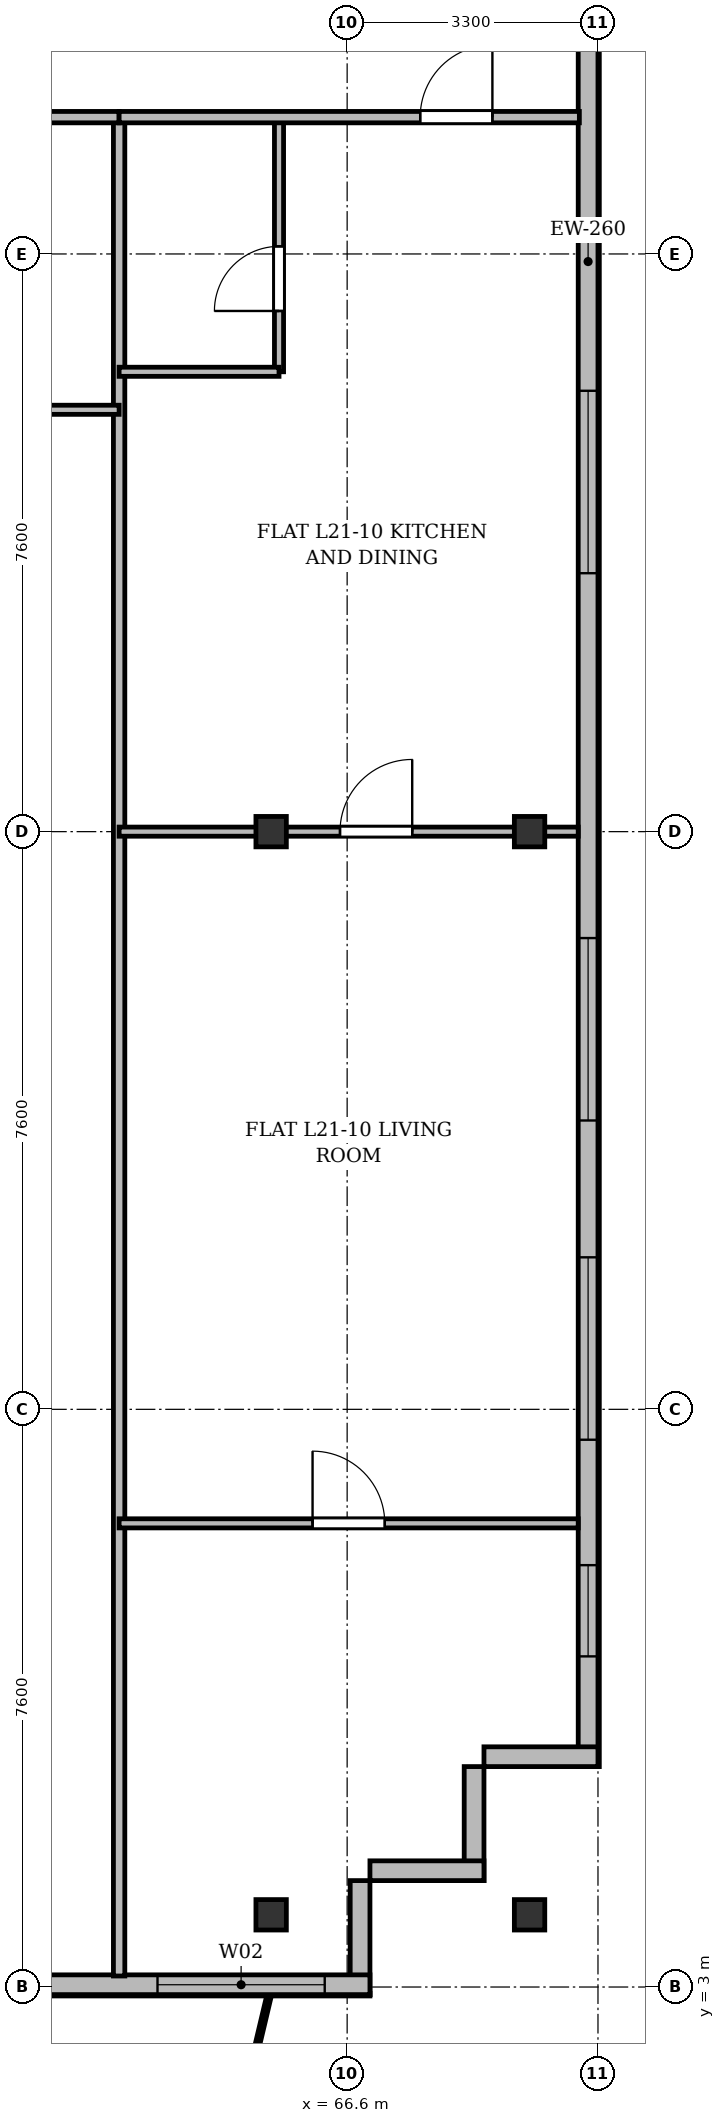
"""IFC4 building model, lengths in metres.
Left out: names, types, materials, properties, quantities, classifications, styles, units other than length and angle.
Written with IfcOpenShell. Run it as: python <this file> out.ifc"""

import sys

from ifc_helpers import new_model, si_unit, direction, frame, frame_2d, origin, origin_2d, place, context, subcontext, project, spatial, rectangle, i_section, extrude, source, transform, mapped, element, fill, save


model = new_model("IFC4")
c1 = context("Model", 3, precision=1e-05, world=origin(), true_north=direction((0.0, 1.0)))
c2 = subcontext(c1, "Body", "Model", "MODEL_VIEW")
j1 = project(units=[si_unit("LENGTHUNIT", "METRE"), si_unit("PLANEANGLEUNIT", "RADIAN")], contexts=[c1])
p1 = place(None, origin())
s1 = spatial("IfcSite", under=j1, at=p1, CompositionType="ELEMENT")
p2 = place(p1, origin())
s2 = spatial("IfcBuilding", under=s1, at=p2, CompositionType="ELEMENT")
p3 = place(p2, frame((0.0, 0.0, 85.3)))
s3 = spatial("IfcBuildingStorey", under=s2, at=p3, CompositionType="ELEMENT", Elevation=85.3)
m1 = source(origin(), c2, "Body", "SweptSolid", [
    extrude(i_section(OverallWidth=0.4, OverallDepth=0.4, WebThickness=0.022, FlangeThickness=0.035, at=origin_2d()), origin(), (0.0, 0.0, 1.0), 3.6),
])
for number, where, z_axis, x_axis in (
    (1, (65.6, 3.95, 0.0), (0.0, 0.0, 1.0), (1.0, 0.0, 0.0)),
    (2, (65.6, 18.2, 0.0), (0.0, 0.0, 1.0), (1.0, 0.0, 0.0)),
    (3, (69.0, 3.95, 0.0), (0.0, 0.0, 1.0), (1.0, 0.0, 0.0)),
    (4, (69.0, 18.2, 0.0), (0.0, 0.0, 1.0), (1.0, 0.0, 0.0)),
):
    element("IfcColumn", number, at=place(p3, frame(where, z_axis=z_axis, x_axis=x_axis)), inside=s3, PredefinedType="COLUMN", context=c2, shape_type="MappedRepresentation", body=[
        mapped(m1, transform((0.0, 0.0, 0.0), x_axis=(1.0, 0.0, 0.0), y_axis=(0.0, 1.0, 0.0), z_axis=(0.0, 0.0, 1.0), scale=1.0)),
    ])
p4 = place(p3, frame((69.77, 45.5, 0.0), z_axis=(0.0, 0.0, 1.0), x_axis=(0.0, -1.0, 0.0)))
e5 = element("IfcWall", 5, at=p4, inside=s3, PredefinedType="SOLIDWALL", context=c2, shape_type="SweptSolid", body=[
    extrude(rectangle(XDim=39.6, YDim=0.26, at=frame_2d((19.8, 0.0))), origin(), (0.0, 0.0, 1.0), 3.34),
])
p5 = place(p4, frame((36.95, 0.0, 0.92)))
e6 = element("IfcOpeningElement", 6, at=p5, cuts=e5, PredefinedType="OPENING", context=c2, shape_type="SweptSolid", body=[
    extrude(rectangle(XDim=1.2, YDim=1.65, at=frame_2d((0.6, 0.825))), frame((0.0, 0.14, 0.0), z_axis=(0.0, -1.0, 0.0), x_axis=(1.0, 0.0, 0.0)), (0.0, 0.0, 1.0), 0.28),
])
p6 = place(p4, frame((32.9, 0.0, 0.92)))
e7 = element("IfcOpeningElement", 7, at=p6, cuts=e5, PredefinedType="OPENING", context=c2, shape_type="SweptSolid", body=[
    extrude(rectangle(XDim=2.4, YDim=2.1, at=frame_2d((1.2, 1.05))), frame((0.0, 0.14, 0.0), z_axis=(0.0, -1.0, 0.0), x_axis=(1.0, 0.0, 0.0)), (0.0, 0.0, 1.0), 0.28),
])
p7 = place(p4, frame((28.7, 0.0, 0.92)))
e8 = element("IfcOpeningElement", 8, at=p7, cuts=e5, PredefinedType="OPENING", context=c2, shape_type="SweptSolid", body=[
    extrude(rectangle(XDim=2.4, YDim=2.1, at=frame_2d((1.2, 1.05))), frame((0.0, 0.14, 0.0), z_axis=(0.0, -1.0, 0.0), x_axis=(1.0, 0.0, 0.0)), (0.0, 0.0, 1.0), 0.28),
])
p8 = place(p4, frame((21.5, 0.0, 0.92)))
e9 = element("IfcOpeningElement", 9, at=p8, cuts=e5, PredefinedType="OPENING", context=c2, shape_type="SweptSolid", body=[
    extrude(rectangle(XDim=2.4, YDim=2.1, at=frame_2d((1.2, 1.05))), frame((0.0, 0.14, 0.0), z_axis=(0.0, -1.0, 0.0), x_axis=(1.0, 0.0, 0.0)), (0.0, 0.0, 1.0), 0.28),
])
p9 = place(p4, frame((7.5, 0.0, 0.92)))
e10 = element("IfcOpeningElement", 10, at=p9, cuts=e5, PredefinedType="OPENING", context=c2, shape_type="SweptSolid", body=[
    extrude(rectangle(XDim=2.4, YDim=2.1, at=frame_2d((1.2, 1.05))), frame((0.0, 0.14, 0.0), z_axis=(0.0, -1.0, 0.0), x_axis=(1.0, 0.0, 0.0)), (0.0, 0.0, 1.0), 0.28),
])
p10 = place(p4, frame((4.5, 0.0, 0.92)))
e11 = element("IfcOpeningElement", 11, at=p10, cuts=e5, PredefinedType="OPENING", context=c2, shape_type="SweptSolid", body=[
    extrude(rectangle(XDim=1.2, YDim=1.65, at=frame_2d((0.6, 0.825))), frame((0.0, 0.14, 0.0), z_axis=(0.0, -1.0, 0.0), x_axis=(1.0, 0.0, 0.0)), (0.0, 0.0, 1.0), 0.28),
])
p11 = place(p4, frame((1.15, 0.0, 0.92)))
e12 = element("IfcOpeningElement", 12, at=p11, cuts=e5, PredefinedType="OPENING", context=c2, shape_type="SweptSolid", body=[
    extrude(rectangle(XDim=1.2, YDim=1.65, at=frame_2d((0.6, 0.825))), frame((0.0, 0.14, 0.0), z_axis=(0.0, -1.0, 0.0), x_axis=(1.0, 0.0, 0.0)), (0.0, 0.0, 1.0), 0.28),
])
p12 = place(p3, frame((69.9, 6.03, 0.0), z_axis=(0.0, 0.0, 1.0), x_axis=(-1.0, 0.0, 0.0)))
e13 = element("IfcWall", 13, at=p12, inside=s3, PredefinedType="SOLIDWALL", context=c2, shape_type="SweptSolid", body=[
    extrude(rectangle(XDim=1.5, YDim=0.26, at=frame_2d((0.75, 0.0))), origin(), (0.0, 0.0, 1.0), 2.84),
])
for number, where, z_axis, x_axis in (
    (14, (68.27, 5.9, 0.0), (0.0, 0.0, 1.0), (0.0, -1.0, 0.0)),
    (15, (68.4, 4.53, 0.0), (0.0, 0.0, 1.0), (-1.0, 0.0, 0.0)),
):
    element("IfcWall", number, at=place(p3, frame(where, z_axis=z_axis, x_axis=x_axis)), inside=s3, PredefinedType="SOLIDWALL", context=c2, shape_type="SweptSolid", body=[
        extrude(rectangle(XDim=1.5, YDim=0.26, at=frame_2d((0.75, 0.0))), origin(), (0.0, 0.0, 1.0), 3.34),
    ])
p13 = place(p3, frame((66.77, 4.4, 0.0), z_axis=(0.0, 0.0, 1.0), x_axis=(0.0, -1.0, 0.0)))
e16 = element("IfcWall", 16, at=p13, inside=s3, PredefinedType="SOLIDWALL", context=c2, shape_type="SweptSolid", body=[
    extrude(rectangle(XDim=1.5, YDim=0.26, at=frame_2d((0.75, 0.0))), origin(), (0.0, 0.0, 1.0), 2.752),
])
p14 = place(p3, frame((66.9, 3.03, 0.0), z_axis=(0.0, 0.0, 1.0), x_axis=(-1.0, 0.0, 0.0)))
e17 = element("IfcWall", 17, at=p14, inside=s3, PredefinedType="SOLIDWALL", context=c2, shape_type="SweptSolid", body=[
    extrude(rectangle(XDim=59.4, YDim=0.26, at=frame_2d((29.7, 0.0))), origin(), (0.0, 0.0, 1.0), 3.34),
])
p15 = place(p14, frame((0.595, 0.0, 0.9)))
e18 = element("IfcOpeningElement", 18, at=p15, cuts=e17, PredefinedType="OPENING", context=c2, shape_type="SweptSolid", body=[
    extrude(rectangle(XDim=2.2, YDim=1.8, at=frame_2d((1.1, 0.9))), frame((0.0, 0.14, 0.0), z_axis=(0.0, -1.0, 0.0), x_axis=(1.0, 0.0, 0.0)), (0.0, 0.0, 1.0), 0.28),
])
p16 = place(p14, frame((4.95, 0.0, 0.9)))
e19 = element("IfcOpeningElement", 19, at=p16, cuts=e17, PredefinedType="OPENING", context=c2, shape_type="SweptSolid", body=[
    extrude(rectangle(XDim=1.5, YDim=1.75, at=frame_2d((0.75, 0.875))), frame((0.0, 0.14, 0.0), z_axis=(0.0, -1.0, 0.0), x_axis=(1.0, 0.0, 0.0)), (0.0, 0.0, 1.0), 0.28),
])
p17 = place(p14, frame((9.18, 0.0, 0.0)))
e20 = element("IfcOpeningElement", 20, at=p17, cuts=e17, PredefinedType="OPENING", context=c2, shape_type="SweptSolid", body=[
    extrude(rectangle(XDim=1.2, YDim=2.2, at=frame_2d((0.6, 1.1))), frame((0.0, 0.14, 0.0), z_axis=(0.0, -1.0, 0.0), x_axis=(1.0, 0.0, 0.0)), (0.0, 0.0, 1.0), 0.28),
])
p18 = place(p14, frame((13.125, 0.0, 0.9)))
e21 = element("IfcOpeningElement", 21, at=p18, cuts=e17, PredefinedType="OPENING", context=c2, shape_type="SweptSolid", body=[
    extrude(rectangle(XDim=1.65, YDim=1.85, at=frame_2d((0.825, 0.925))), frame((0.0, 0.14, 0.0), z_axis=(0.0, -1.0, 0.0), x_axis=(1.0, 0.0, 0.0)), (0.0, 0.0, 1.0), 0.28),
])
p19 = place(p14, frame((16.2, 0.0, 0.9)))
e22 = element("IfcOpeningElement", 22, at=p19, cuts=e17, PredefinedType="OPENING", context=c2, shape_type="SweptSolid", body=[
    extrude(rectangle(XDim=1.8, YDim=1.8, at=frame_2d((0.9, 0.9))), frame((0.0, 0.14, 0.0), z_axis=(0.0, -1.0, 0.0), x_axis=(1.0, 0.0, 0.0)), (0.0, 0.0, 1.0), 0.28),
])
p20 = place(p14, frame((18.75, 0.0, 0.9)))
e23 = element("IfcOpeningElement", 23, at=p20, cuts=e17, PredefinedType="OPENING", context=c2, shape_type="SweptSolid", body=[
    extrude(rectangle(XDim=1.5, YDim=1.75, at=frame_2d((0.75, 0.875))), frame((0.0, 0.14, 0.0), z_axis=(0.0, -1.0, 0.0), x_axis=(1.0, 0.0, 0.0)), (0.0, 0.0, 1.0), 0.28),
])
p21 = place(p14, frame((21.15, 0.0, 0.9)))
e24 = element("IfcOpeningElement", 24, at=p21, cuts=e17, PredefinedType="OPENING", context=c2, shape_type="SweptSolid", body=[
    extrude(rectangle(XDim=1.5, YDim=1.75, at=frame_2d((0.75, 0.875))), frame((0.0, 0.14, 0.0), z_axis=(0.0, -1.0, 0.0), x_axis=(1.0, 0.0, 0.0)), (0.0, 0.0, 1.0), 0.28),
])
p22 = place(p14, frame((23.85, 0.0, 0.9)))
e25 = element("IfcOpeningElement", 25, at=p22, cuts=e17, PredefinedType="OPENING", context=c2, shape_type="SweptSolid", body=[
    extrude(rectangle(XDim=2.0, YDim=1.95, at=frame_2d((1.0, 0.975))), frame((0.0, 0.14, 0.0), z_axis=(0.0, -1.0, 0.0), x_axis=(1.0, 0.0, 0.0)), (0.0, 0.0, 1.0), 0.28),
])
p23 = place(p14, frame((27.525, 0.0, 0.9)))
e26 = element("IfcOpeningElement", 26, at=p23, cuts=e17, PredefinedType="OPENING", context=c2, shape_type="SweptSolid", body=[
    extrude(rectangle(XDim=1.65, YDim=1.85, at=frame_2d((0.825, 0.925))), frame((0.0, 0.14, 0.0), z_axis=(0.0, -1.0, 0.0), x_axis=(1.0, 0.0, 0.0)), (0.0, 0.0, 1.0), 0.28),
])
p24 = place(p14, frame((32.3, 0.0, 0.9)))
e27 = element("IfcOpeningElement", 27, at=p24, cuts=e17, PredefinedType="OPENING", context=c2, shape_type="SweptSolid", body=[
    extrude(rectangle(XDim=1.8, YDim=1.8, at=frame_2d((0.9, 0.9))), frame((0.0, 0.14, 0.0), z_axis=(0.0, -1.0, 0.0), x_axis=(1.0, 0.0, 0.0)), (0.0, 0.0, 1.0), 0.28),
])
p25 = place(p14, frame((40.301, 0.0, 0.0)))
e28 = element("IfcOpeningElement", 28, at=p25, cuts=e17, PredefinedType="OPENING", context=c2, shape_type="SweptSolid", body=[
    extrude(rectangle(XDim=1.2, YDim=2.2, at=frame_2d((0.6, 1.1))), frame((0.0, 0.14, 0.0), z_axis=(0.0, -1.0, 0.0), x_axis=(1.0, 0.0, 0.0)), (0.0, 0.0, 1.0), 0.28),
])
p26 = place(p14, frame((46.65, 0.0, 0.9)))
e29 = element("IfcOpeningElement", 29, at=p26, cuts=e17, PredefinedType="OPENING", context=c2, shape_type="SweptSolid", body=[
    extrude(rectangle(XDim=1.5, YDim=1.75, at=frame_2d((0.75, 0.875))), frame((0.0, 0.14, 0.0), z_axis=(0.0, -1.0, 0.0), x_axis=(1.0, 0.0, 0.0)), (0.0, 0.0, 1.0), 0.28),
])
p27 = place(p14, frame((54.558, 0.0, 0.0)))
e30 = element("IfcOpeningElement", 30, at=p27, cuts=e17, PredefinedType="OPENING", context=c2, shape_type="SweptSolid", body=[
    extrude(rectangle(XDim=1.2, YDim=2.2, at=frame_2d((0.6, 1.1))), frame((0.0, 0.14, 0.0), z_axis=(0.0, -1.0, 0.0), x_axis=(1.0, 0.0, 0.0)), (0.0, 0.0, 1.0), 0.28),
])
p28 = place(p14, frame((56.98, 0.0, 0.9)))
e31 = element("IfcOpeningElement", 31, at=p28, cuts=e17, PredefinedType="OPENING", context=c2, shape_type="SweptSolid", body=[
    extrude(rectangle(XDim=1.65, YDim=1.85, at=frame_2d((0.825, 0.925))), frame((0.0, 0.14, 0.0), z_axis=(0.0, -1.0, 0.0), x_axis=(1.0, 0.0, 0.0)), (0.0, 0.0, 1.0), 0.28),
])
p29 = place(p3, frame((63.6, 3.145, 0.0), z_axis=(0.0, 0.0, 1.0), x_axis=(0.0, 1.0, 0.0)))
e32 = element("IfcWall", 32, at=p29, inside=s3, PredefinedType="PARTITIONING", context=c2, shape_type="SweptSolid", body=[
    extrude(rectangle(XDim=24.455, YDim=0.15, at=frame_2d((12.228, 0.0))), origin(), (0.0, 0.0, 1.0), 2.752),
])
p30 = place(p3, frame((58.8, 27.6, 0.0), z_axis=(0.0, 0.0, 1.0), x_axis=(1.0, 0.0, 0.0)))
e33 = element("IfcWall", 33, at=p30, inside=s3, PredefinedType="PARTITIONING", context=c2, shape_type="SweptSolid", body=[
    extrude(rectangle(XDim=4.8, YDim=0.15, at=frame_2d((2.4, 0.0))), origin(), (0.0, 0.0, 1.0), 2.84),
])
p31 = place(p30, frame((1.834, 0.0, 0.0)))
e34 = element("IfcOpeningElement", 34, at=p31, cuts=e33, PredefinedType="OPENING", context=c2, shape_type="SweptSolid", body=[
    extrude(rectangle(XDim=0.95, YDim=2.15, at=frame_2d((0.475, 1.075))), frame((0.0, 0.085, 0.0), z_axis=(0.0, -1.0, 0.0), x_axis=(1.0, 0.0, 0.0)), (0.0, 0.0, 1.0), 0.17),
])
p32 = place(p3, frame((58.8, 23.75, 0.0), z_axis=(0.0, 0.0, 1.0), x_axis=(1.0, 0.0, 0.0)))
e35 = element("IfcWall", 35, at=p32, inside=s3, PredefinedType="PARTITIONING", context=c2, shape_type="SweptSolid", body=[
    extrude(rectangle(XDim=4.8, YDim=0.12, at=frame_2d((2.4, 0.0))), origin(), (0.0, 0.0, 1.0), 2.84),
])
p33 = place(p32, frame((1.834, 0.0, 0.0)))
e36 = element("IfcOpeningElement", 36, at=p33, cuts=e35, PredefinedType="OPENING", context=c2, shape_type="SweptSolid", body=[
    extrude(rectangle(XDim=0.95, YDim=2.15, at=frame_2d((0.475, 1.075))), frame((0.0, 0.07, 0.0), z_axis=(0.0, -1.0, 0.0), x_axis=(1.0, 0.0, 0.0)), (0.0, 0.0, 1.0), 0.14),
])
p34 = place(p3, frame((63.6, 18.2, 0.0), z_axis=(0.0, 0.0, 1.0), x_axis=(1.0, 0.0, 0.0)))
e37 = element("IfcWall", 37, at=p34, inside=s3, PredefinedType="PARTITIONING", context=c2, shape_type="SweptSolid", body=[
    extrude(rectangle(XDim=6.04, YDim=0.12, at=frame_2d((3.02, 0.0))), origin(), (0.0, 0.0, 1.0), 2.752),
])
p35 = place(p34, frame((2.906, 0.0, 0.0)))
e38 = element("IfcOpeningElement", 38, at=p35, cuts=e37, PredefinedType="OPENING", context=c2, shape_type="SweptSolid", body=[
    extrude(rectangle(XDim=0.95, YDim=2.15, at=frame_2d((0.475, 1.075))), frame((0.0, 0.07, 0.0), z_axis=(0.0, -1.0, 0.0), x_axis=(1.0, 0.0, 0.0)), (0.0, 0.0, 1.0), 0.14),
])
p36 = place(p3, frame((65.704, 24.25, 0.0), z_axis=(0.0, 0.0, 1.0), x_axis=(0.0, 1.0, 0.0)))
e39 = element("IfcWall", 39, at=p36, inside=s3, PredefinedType="PARTITIONING", context=c2, shape_type="SweptSolid", body=[
    extrude(rectangle(XDim=3.35, YDim=0.12, at=frame_2d((1.675, 0.0))), origin(), (0.0, 0.0, 1.0), 2.84),
])
p37 = place(p36, frame((0.8, 0.0, 0.0)))
e40 = element("IfcOpeningElement", 40, at=p37, cuts=e39, PredefinedType="OPENING", context=c2, shape_type="SweptSolid", body=[
    extrude(rectangle(XDim=0.85, YDim=2.1, at=frame_2d((0.425, 1.05))), frame((0.0, 0.07, 0.0), z_axis=(0.0, -1.0, 0.0), x_axis=(1.0, 0.0, 0.0)), (0.0, 0.0, 1.0), 0.14),
])
p38 = place(p3, frame((63.6, 24.25, 0.0), z_axis=(0.0, 0.0, 1.0), x_axis=(1.0, 0.0, 0.0)))
e41 = element("IfcWall", 41, at=p38, inside=s3, PredefinedType="PARTITIONING", context=c2, shape_type="SweptSolid", body=[
    extrude(rectangle(XDim=2.104, YDim=0.12, at=frame_2d((1.052, 0.0))), origin(), (0.0, 0.0, 1.0), 2.84),
])
p39 = place(p3, frame((63.6, 27.6, 0.0), z_axis=(0.0, 0.0, 1.0), x_axis=(1.0, 0.0, 0.0)))
e42 = element("IfcWall", 42, at=p39, inside=s3, PredefinedType="PARTITIONING", context=c2, shape_type="SweptSolid", body=[
    extrude(rectangle(XDim=6.055, YDim=0.15, at=frame_2d((3.027, 0.0))), origin(), (0.0, 0.0, 1.0), 2.84),
])
p40 = place(p39, frame((3.961, 0.0, 0.0)))
e43 = element("IfcOpeningElement", 43, at=p40, cuts=e42, PredefinedType="OPENING", context=c2, shape_type="SweptSolid", body=[
    extrude(rectangle(XDim=0.95, YDim=2.15, at=frame_2d((0.475, 1.075))), frame((0.0, 0.085, 0.0), z_axis=(0.0, -1.0, 0.0), x_axis=(1.0, 0.0, 0.0)), (0.0, 0.0, 1.0), 0.17),
])
p41 = place(p3, frame((63.6, 9.1, 0.0), z_axis=(0.0, 0.0, 1.0), x_axis=(1.0, 0.0, 0.0)))
e44 = element("IfcWall", 44, at=p41, inside=s3, PredefinedType="PARTITIONING", context=c2, shape_type="SweptSolid", body=[
    extrude(rectangle(XDim=6.04, YDim=0.12, at=frame_2d((3.02, 0.0))), origin(), (0.0, 0.0, 1.0), 2.84),
])
p42 = place(p41, frame((2.545, 0.0, 0.0)))
e45 = element("IfcOpeningElement", 45, at=p42, cuts=e44, PredefinedType="OPENING", context=c2, shape_type="SweptSolid", body=[
    extrude(rectangle(XDim=0.95, YDim=2.15, at=frame_2d((0.475, 1.075))), frame((0.0, 0.07, 0.0), z_axis=(0.0, -1.0, 0.0), x_axis=(1.0, 0.0, 0.0)), (0.0, 0.0, 1.0), 0.14),
])
m2 = source(origin(), c2, "Body", "SweptSolid", [
    extrude(rectangle(XDim=1.2, YDim=1.65, at=frame_2d((0.6, 0.825))), frame((0.0, 0.03, 0.0), z_axis=(0.0, -1.0, 0.0), x_axis=(1.0, 0.0, 0.0)), (0.0, 0.0, 1.0), 0.06),
])
p43 = place(p5, origin())
e46 = element("IfcWindow", 46, at=p43, inside=s3, PartitioningType="SINGLE_PANEL", PredefinedType="WINDOW", context=c2, shape_type="MappedRepresentation", body=[
    mapped(m2, transform((0.0, 0.0, 0.0), x_axis=(1.0, 0.0, 0.0), y_axis=(0.0, 1.0, 0.0), z_axis=(0.0, 0.0, 1.0), scale=1.0)),
])
fill(e6, e46)
m3 = source(origin(), c2, "Body", "SweptSolid", [
    extrude(rectangle(XDim=2.4, YDim=2.1, at=frame_2d((1.2, 1.05))), frame((0.0, 0.03, 0.0), z_axis=(0.0, -1.0, 0.0), x_axis=(1.0, 0.0, 0.0)), (0.0, 0.0, 1.0), 0.06),
])
p44 = place(p6, origin())
e47 = element("IfcWindow", 47, at=p44, inside=s3, PartitioningType="SINGLE_PANEL", PredefinedType="WINDOW", context=c2, shape_type="MappedRepresentation", body=[
    mapped(m3, transform((0.0, 0.0, 0.0), x_axis=(1.0, 0.0, 0.0), y_axis=(0.0, 1.0, 0.0), z_axis=(0.0, 0.0, 1.0), scale=1.0)),
])
fill(e7, e47)
p45 = place(p7, origin())
e48 = element("IfcWindow", 48, at=p45, inside=s3, PartitioningType="SINGLE_PANEL", PredefinedType="WINDOW", context=c2, shape_type="MappedRepresentation", body=[
    mapped(m3, transform((0.0, 0.0, 0.0), x_axis=(1.0, 0.0, 0.0), y_axis=(0.0, 1.0, 0.0), z_axis=(0.0, 0.0, 1.0), scale=1.0)),
])
fill(e8, e48)
p46 = place(p8, origin())
e49 = element("IfcWindow", 49, at=p46, inside=s3, PartitioningType="SINGLE_PANEL", PredefinedType="WINDOW", context=c2, shape_type="MappedRepresentation", body=[
    mapped(m3, transform((0.0, 0.0, 0.0), x_axis=(1.0, 0.0, 0.0), y_axis=(0.0, 1.0, 0.0), z_axis=(0.0, 0.0, 1.0), scale=1.0)),
])
fill(e9, e49)
m4 = source(origin(), c2, "Body", "SweptSolid", [
    extrude(rectangle(XDim=2.2, YDim=1.8, at=frame_2d((1.1, 0.9))), frame((0.0, 0.03, 0.0), z_axis=(0.0, -1.0, 0.0), x_axis=(1.0, 0.0, 0.0)), (0.0, 0.0, 1.0), 0.06),
])
p47 = place(p15, origin())
e50 = element("IfcWindow", 50, at=p47, inside=s3, PartitioningType="SINGLE_PANEL", PredefinedType="WINDOW", context=c2, shape_type="MappedRepresentation", body=[
    mapped(m4, transform((0.0, 0.0, 0.0), x_axis=(1.0, 0.0, 0.0), y_axis=(0.0, 1.0, 0.0), z_axis=(0.0, 0.0, 1.0), scale=1.0)),
])
fill(e18, e50)
m5 = source(origin(), c2, "Body", "SweptSolid", [
    extrude(rectangle(XDim=0.95, YDim=2.15, at=frame_2d((0.475, 1.075))), frame((0.0, 0.025, 0.0), z_axis=(0.0, -1.0, 0.0), x_axis=(1.0, 0.0, 0.0)), (0.0, 0.0, 1.0), 0.05),
])
p48 = place(p35, origin())
e51 = element("IfcDoor", 51, at=p48, inside=s3, OperationType="SINGLE_SWING_RIGHT", PredefinedType="DOOR", context=c2, shape_type="MappedRepresentation", body=[
    mapped(m5, transform((0.0, 0.0, 0.0), x_axis=(1.0, 0.0, 0.0), y_axis=(0.0, 1.0, 0.0), z_axis=(0.0, 0.0, 1.0), scale=1.0)),
])
fill(e38, e51)
m6 = source(origin(), c2, "Body", "SweptSolid", [
    extrude(rectangle(XDim=0.85, YDim=2.1, at=frame_2d((0.425, 1.05))), frame((0.0, 0.025, 0.0), z_axis=(0.0, -1.0, 0.0), x_axis=(1.0, 0.0, 0.0)), (0.0, 0.0, 1.0), 0.05),
])
p49 = place(p37, origin())
e52 = element("IfcDoor", 52, at=p49, inside=s3, OperationType="SINGLE_SWING_LEFT", PredefinedType="DOOR", context=c2, shape_type="MappedRepresentation", body=[
    mapped(m6, transform((0.0, 0.0, 0.0), x_axis=(1.0, 0.0, 0.0), y_axis=(0.0, 1.0, 0.0), z_axis=(0.0, 0.0, 1.0), scale=1.0)),
])
fill(e40, e52)
p50 = place(p40, origin())
e53 = element("IfcDoor", 53, at=p50, inside=s3, OperationType="SINGLE_SWING_RIGHT", PredefinedType="DOOR", context=c2, shape_type="MappedRepresentation", body=[
    mapped(m5, transform((0.0, 0.0, 0.0), x_axis=(1.0, 0.0, 0.0), y_axis=(0.0, 1.0, 0.0), z_axis=(0.0, 0.0, 1.0), scale=1.0)),
])
fill(e43, e53)
p51 = place(p42, origin())
e54 = element("IfcDoor", 54, at=p51, inside=s3, OperationType="SINGLE_SWING_LEFT", PredefinedType="DOOR", context=c2, shape_type="MappedRepresentation", body=[
    mapped(m5, transform((0.0, 0.0, 0.0), x_axis=(1.0, 0.0, 0.0), y_axis=(0.0, 1.0, 0.0), z_axis=(0.0, 0.0, 1.0), scale=1.0)),
])
fill(e45, e54)
save(model, sys.argv[1])
